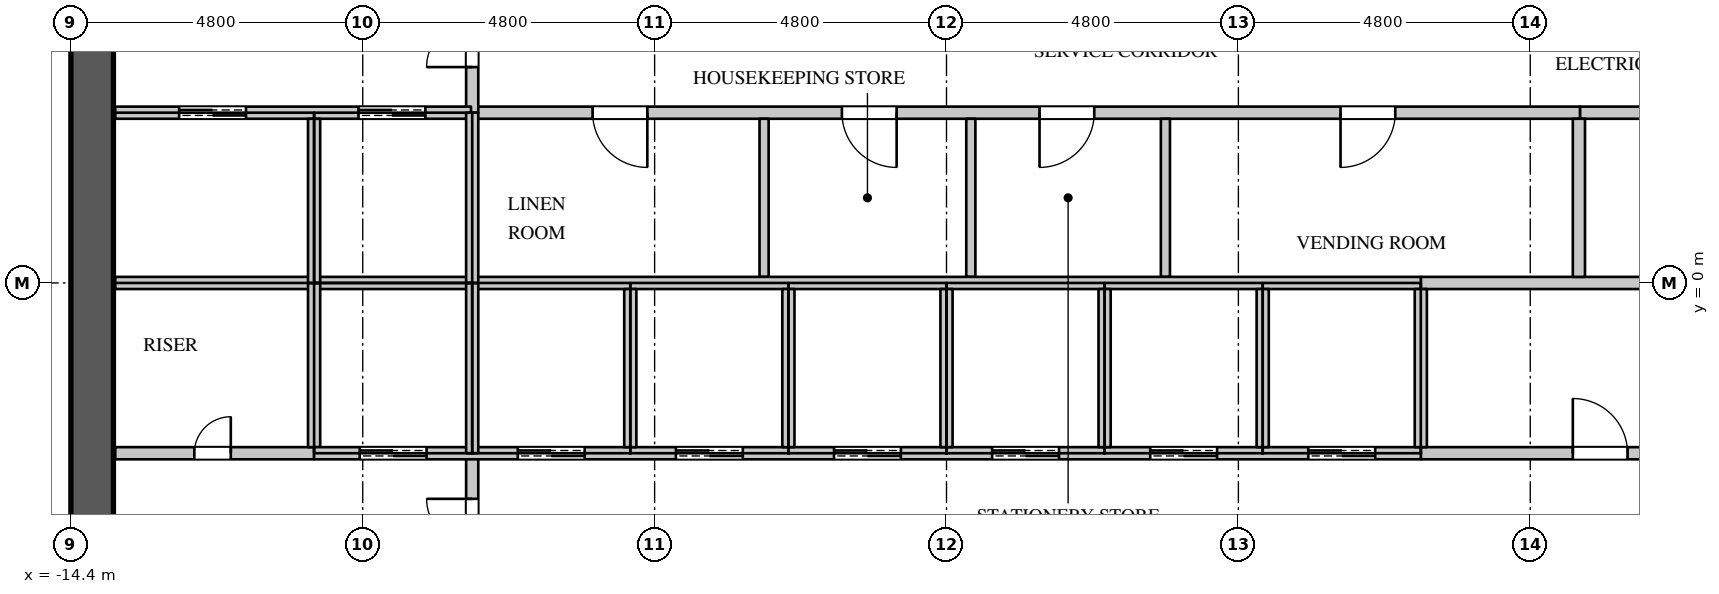
"""IFC4 building model, lengths in metres.
Left out: names, types, materials, properties, quantities, classifications, styles, units other than length and angle.
Written with IfcOpenShell. Run it as: python <this file> out.ifc"""

import sys

from ifc_helpers import new_model, si_unit, direction, frame, frame_2d, origin, place, context, subcontext, project, spatial, rectangle, extrude, element, fill, save


model = new_model("IFC4")
c1 = context("Model", 3, precision=1e-05, world=origin(), true_north=direction((0.0, 1.0)))
c2 = subcontext(c1, "Body", "Model", "MODEL_VIEW")
j1 = project(units=[si_unit("LENGTHUNIT", "METRE"), si_unit("PLANEANGLEUNIT", "RADIAN")], contexts=[c1])
p1 = place(None, origin())
s1 = spatial("IfcSite", under=j1, at=p1, CompositionType="ELEMENT")
p2 = place(p1, origin())
s2 = spatial("IfcBuilding", under=s1, at=p2, CompositionType="ELEMENT")
p3 = place(p2, frame((0.0, 0.0, 174.9)))
s3 = spatial("IfcBuildingStorey", under=s2, at=p3, CompositionType="ELEMENT", Elevation=174.9)
p4 = place(p3, frame((-14.05, -11.3, 0.0), z_axis=(0.0, 0.0, 1.0), x_axis=(0.0, 1.0, 0.0)))
e1 = element("IfcWall", 1, at=p4, inside=s3, PredefinedType="SHEAR", context=c2, shape_type="SweptSolid", body=[
    extrude(rectangle(XDim=22.6, YDim=0.7, at=frame_2d((11.3, 0.0))), origin(), (0.0, 0.0, 1.0), 4.2),
])
p5 = place(p4, frame((20.35, 0.0, 0.0)))
e2 = element("IfcOpeningElement", 2, at=p5, cuts=e1, PredefinedType="OPENING", context=c2, shape_type="SweptSolid", body=[
    extrude(rectangle(XDim=1.1, YDim=2.2, at=frame_2d((0.55, 1.1))), frame((0.0, 0.36, 0.0), z_axis=(0.0, -1.0, 0.0), x_axis=(1.0, 0.0, 0.0)), (0.0, 0.0, 1.0), 0.72),
])
p6 = place(p4, frame((1.15, 0.0, 0.0)))
e3 = element("IfcOpeningElement", 3, at=p6, cuts=e1, PredefinedType="OPENING", context=c2, shape_type="SweptSolid", body=[
    extrude(rectangle(XDim=1.1, YDim=2.2, at=frame_2d((0.55, 1.1))), frame((0.0, 0.36, 0.0), z_axis=(0.0, -1.0, 0.0), x_axis=(1.0, 0.0, 0.0)), (0.0, 0.0, 1.0), 0.72),
])
p7 = place(p4, frame((16.05, 0.0, 0.0)))
e4 = element("IfcOpeningElement", 4, at=p7, cuts=e1, PredefinedType="OPENING", context=c2, shape_type="SweptSolid", body=[
    extrude(rectangle(XDim=1.5, YDim=2.4, at=frame_2d((0.75, 1.2))), frame((0.0, 0.36, 0.0), z_axis=(0.0, -1.0, 0.0), x_axis=(1.0, 0.0, 0.0)), (0.0, 0.0, 1.0), 0.72),
])
p8 = place(p4, frame((5.05, 0.0, 0.0)))
e5 = element("IfcOpeningElement", 5, at=p8, cuts=e1, PredefinedType="OPENING", context=c2, shape_type="SweptSolid", body=[
    extrude(rectangle(XDim=1.5, YDim=2.4, at=frame_2d((0.75, 1.2))), frame((0.0, 0.36, 0.0), z_axis=(0.0, -1.0, 0.0), x_axis=(1.0, 0.0, 0.0)), (0.0, 0.0, 1.0), 0.72),
])
p9 = place(p3, frame((-7.82, 2.8, 0.0), z_axis=(0.0, 0.0, 1.0), x_axis=(1.0, 0.0, 0.0)))
e6 = element("IfcWall", 6, at=p9, inside=s3, PredefinedType="PARTITIONING", context=c2, shape_type="SweptSolid", body=[
    extrude(rectangle(XDim=18.24, YDim=0.2, at=frame_2d((9.12, 0.0))), origin(), (0.0, 0.0, 1.0), 3.95),
])
p10 = place(p9, frame((2.0, 0.0, 0.0)))
e7 = element("IfcOpeningElement", 7, at=p10, cuts=e6, PredefinedType="OPENING", context=c2, shape_type="SweptSolid", body=[
    extrude(rectangle(XDim=0.9, YDim=2.2, at=frame_2d((0.45, 1.1))), frame((0.0, 0.11, 0.0), z_axis=(0.0, -1.0, 0.0), x_axis=(1.0, 0.0, 0.0)), (0.0, 0.0, 1.0), 0.22),
])
p11 = place(p9, frame((6.1, 0.0, 0.0)))
e8 = element("IfcOpeningElement", 8, at=p11, cuts=e6, PredefinedType="OPENING", context=c2, shape_type="SweptSolid", body=[
    extrude(rectangle(XDim=0.9, YDim=2.2, at=frame_2d((0.45, 1.1))), frame((0.0, 0.11, 0.0), z_axis=(0.0, -1.0, 0.0), x_axis=(1.0, 0.0, 0.0)), (0.0, 0.0, 1.0), 0.22),
])
p12 = place(p9, frame((9.35, 0.0, 0.0)))
e9 = element("IfcOpeningElement", 9, at=p12, cuts=e6, PredefinedType="OPENING", context=c2, shape_type="SweptSolid", body=[
    extrude(rectangle(XDim=0.9, YDim=2.2, at=frame_2d((0.45, 1.1))), frame((0.0, 0.11, 0.0), z_axis=(0.0, -1.0, 0.0), x_axis=(1.0, 0.0, 0.0)), (0.0, 0.0, 1.0), 0.22),
])
p13 = place(p9, frame((14.3, 0.0, 0.0)))
e10 = element("IfcOpeningElement", 10, at=p13, cuts=e6, PredefinedType="OPENING", context=c2, shape_type="SweptSolid", body=[
    extrude(rectangle(XDim=0.9, YDim=2.2, at=frame_2d((0.45, 1.1))), frame((0.0, 0.11, 0.0), z_axis=(0.0, -1.0, 0.0), x_axis=(1.0, 0.0, 0.0)), (0.0, 0.0, 1.0), 0.22),
])
p14 = place(p3, frame((-7.8, -5.8, 0.0), z_axis=(0.0, 0.0, 1.0), x_axis=(0.0, 1.0, 0.0)))
e11 = element("IfcWall", 11, at=p14, inside=s3, PredefinedType="PARTITIONING", context=c2, shape_type="SweptSolid", body=[
    extrude(rectangle(XDim=3.0, YDim=0.2, at=frame_2d((1.5, 0.0))), origin(), (0.0, 0.0, 1.0), 3.95),
])
p15 = place(p14, frame((0.75, 0.0, 0.0)))
e12 = element("IfcOpeningElement", 12, at=p15, cuts=e11, PredefinedType="OPENING", context=c2, shape_type="SweptSolid", body=[
    extrude(rectangle(XDim=1.5, YDim=2.4, at=frame_2d((0.75, 1.2))), frame((0.0, 0.11, 0.0), z_axis=(0.0, -1.0, 0.0), x_axis=(1.0, 0.0, 0.0)), (0.0, 0.0, 1.0), 0.22),
])
p16 = place(p3, frame((-7.8, 2.8, 0.0), z_axis=(0.0, 0.0, 1.0), x_axis=(0.0, 1.0, 0.0)))
e13 = element("IfcWall", 13, at=p16, inside=s3, PredefinedType="PARTITIONING", context=c2, shape_type="SweptSolid", body=[
    extrude(rectangle(XDim=5.275, YDim=0.2, at=frame_2d((2.637, 0.0))), origin(), (0.0, 0.0, 1.0), 3.95),
])
p17 = place(p16, frame((0.75, 0.0, 0.0)))
e14 = element("IfcOpeningElement", 14, at=p17, cuts=e13, PredefinedType="OPENING", context=c2, shape_type="SweptSolid", body=[
    extrude(rectangle(XDim=1.5, YDim=2.4, at=frame_2d((0.75, 1.2))), frame((0.0, 0.11, 0.0), z_axis=(0.0, -1.0, 0.0), x_axis=(1.0, 0.0, 0.0)), (0.0, 0.0, 1.0), 0.22),
])
for number, where, z_axis, x_axis in (
    (15, (-3.0, 0.1, 0.0), (0.0, 0.0, 1.0), (0.0, 1.0, 0.0)),
    (16, (0.4, 0.1, 0.0), (0.0, 0.0, 1.0), (0.0, 1.0, 0.0)),
    (17, (3.6, 0.1, 0.0), (0.0, 0.0, 1.0), (0.0, 1.0, 0.0)),
):
    element("IfcWall", number, at=place(p3, frame(where, z_axis=z_axis, x_axis=x_axis)), inside=s3, PredefinedType="PARTITIONING", context=c2, shape_type="SweptSolid", body=[
        extrude(rectangle(XDim=2.6, YDim=0.15, at=frame_2d((1.3, 0.0))), origin(), (0.0, 0.0, 1.0), 3.95),
    ])
p18 = place(p3, frame((-13.67, -2.8, 0.0), z_axis=(0.0, 0.0, 1.0), x_axis=(1.0, 0.0, 0.0)))
e18 = element("IfcWall", 18, at=p18, inside=s3, PredefinedType="PARTITIONING", context=c2, shape_type="SweptSolid", body=[
    extrude(rectangle(XDim=3.27, YDim=0.2, at=frame_2d((1.635, 0.0))), origin(), (0.0, 0.0, 1.0), 3.95),
])
p19 = place(p18, frame((1.3, 0.0, 0.0)))
e19 = element("IfcOpeningElement", 19, at=p19, cuts=e18, PredefinedType="OPENING", context=c2, shape_type="SweptSolid", body=[
    extrude(rectangle(XDim=0.6, YDim=2.0, at=frame_2d((0.3, 1.0))), frame((0.0, 0.11, 0.0), z_axis=(0.0, -1.0, 0.0), x_axis=(1.0, 0.0, 0.0)), (0.0, 0.0, 1.0), 0.22),
])
p20 = place(p3, frame((7.8, -2.8, 0.0), z_axis=(0.0, 0.0, 1.0), x_axis=(1.0, 0.0, 0.0)))
e20 = element("IfcWall", 20, at=p20, inside=s3, PredefinedType="PARTITIONING", context=c2, shape_type="SweptSolid", body=[
    extrude(rectangle(XDim=5.87, YDim=0.2, at=frame_2d((2.935, 0.0))), origin(), (0.0, 0.0, 1.0), 3.95),
])
p21 = place(p20, frame((2.5, 0.0, 0.0)))
e21 = element("IfcOpeningElement", 21, at=p21, cuts=e20, PredefinedType="OPENING", context=c2, shape_type="SweptSolid", body=[
    extrude(rectangle(XDim=0.9, YDim=2.2, at=frame_2d((0.45, 1.1))), frame((0.0, 0.11, 0.0), z_axis=(0.0, -1.0, 0.0), x_axis=(1.0, 0.0, 0.0)), (0.0, 0.0, 1.0), 0.22),
])
p22 = place(p3, frame((7.8, 0.0, 0.0), z_axis=(0.0, 0.0, 1.0), x_axis=(1.0, 0.0, 0.0)))
e22 = element("IfcWall", 22, at=p22, inside=s3, PredefinedType="PARTITIONING", context=c2, shape_type="SweptSolid", body=[
    extrude(rectangle(XDim=5.87, YDim=0.2, at=frame_2d((2.935, 0.0))), origin(), (0.0, 0.0, 1.0), 3.95),
])
p23 = place(p3, frame((10.42, 2.8, 0.0), z_axis=(0.0, 0.0, 1.0), x_axis=(1.0, 0.0, 0.0)))
e23 = element("IfcWall", 23, at=p23, inside=s3, PredefinedType="PARTITIONING", context=c2, shape_type="SweptSolid", body=[
    extrude(rectangle(XDim=3.25, YDim=0.2, at=frame_2d((1.625, 0.0))), origin(), (0.0, 0.0, 1.0), 3.95),
])
p24 = place(p23, frame((1.3, 0.0, 0.0)))
e24 = element("IfcOpeningElement", 24, at=p24, cuts=e23, PredefinedType="OPENING", context=c2, shape_type="SweptSolid", body=[
    extrude(rectangle(XDim=0.6, YDim=2.0, at=frame_2d((0.3, 1.0))), frame((0.0, 0.11, 0.0), z_axis=(0.0, -1.0, 0.0), x_axis=(1.0, 0.0, 0.0)), (0.0, 0.0, 1.0), 0.22),
])
p25 = place(p3, frame((10.4, 0.1, 0.0), z_axis=(0.0, 0.0, 1.0), x_axis=(0.0, 1.0, 0.0)))
e25 = element("IfcWall", 25, at=p25, inside=s3, PredefinedType="PARTITIONING", context=c2, shape_type="SweptSolid", body=[
    extrude(rectangle(XDim=2.6, YDim=0.2, at=frame_2d((1.3, 0.0))), origin(), (0.0, 0.0, 1.0), 3.95),
])
p26 = place(p3, frame((-13.67, 0.0, 0.0), z_axis=(0.0, 0.0, 1.0), x_axis=(1.0, 0.0, 0.0)))
e26 = element("IfcWall", 26, at=p26, inside=s3, PredefinedType="PARTITIONING", context=c2, shape_type="SweptSolid", body=[
    extrude(rectangle(XDim=21.47, YDim=0.2, at=frame_2d((10.735, 0.0))), origin(), (0.0, 0.0, 1.0), 3.95),
])
p27 = place(p3, frame((-13.67, 2.8, 0.0), z_axis=(0.0, 0.0, 1.0), x_axis=(1.0, 0.0, 0.0)))
e27 = element("IfcWall", 27, at=p27, inside=s3, PredefinedType="PARTITIONING", context=c2, shape_type="SweptSolid", body=[
    extrude(rectangle(XDim=5.85, YDim=0.2, at=frame_2d((2.925, 0.0))), origin(), (0.0, 0.0, 1.0), 3.95),
])
p28 = place(p27, frame((1.05, 0.0, 0.0)))
e28 = element("IfcOpeningElement", 28, at=p28, cuts=e27, PredefinedType="OPENING", context=c2, shape_type="SweptSolid", body=[
    extrude(rectangle(XDim=1.1, YDim=2.2, at=frame_2d((0.55, 1.1))), frame((0.0, 0.11, 0.0), z_axis=(0.0, -1.0, 0.0), x_axis=(1.0, 0.0, 0.0)), (0.0, 0.0, 1.0), 0.22),
])
p29 = place(p27, frame((4.0, 0.0, 0.0)))
e29 = element("IfcOpeningElement", 29, at=p29, cuts=e27, PredefinedType="OPENING", context=c2, shape_type="SweptSolid", body=[
    extrude(rectangle(XDim=1.1, YDim=2.2, at=frame_2d((0.55, 1.1))), frame((0.0, 0.11, 0.0), z_axis=(0.0, -1.0, 0.0), x_axis=(1.0, 0.0, 0.0)), (0.0, 0.0, 1.0), 0.22),
])
p30 = place(p3, frame((-10.4, -2.7, 0.0), z_axis=(0.0, 0.0, 1.0), x_axis=(0.0, 1.0, 0.0)))
e30 = element("IfcWall", 30, at=p30, inside=s3, PredefinedType="PARTITIONING", context=c2, shape_type="SweptSolid", body=[
    extrude(rectangle(XDim=2.7, YDim=0.2, at=frame_2d((1.35, 0.0))), origin(), (0.0, 0.0, 1.0), 3.95),
])
p31 = place(p3, frame((-10.4, -2.8, 0.0), z_axis=(0.0, 0.0, 1.0), x_axis=(1.0, 0.0, 0.0)))
e31 = element("IfcWall", 31, at=p31, inside=s3, PredefinedType="PARTITIONING", context=c2, shape_type="SweptSolid", body=[
    extrude(rectangle(XDim=18.2, YDim=0.2, at=frame_2d((9.1, 0.0))), origin(), (0.0, 0.0, 1.0), 3.95),
])
p32 = place(p31, frame((0.75, 0.0, 0.0)))
e32 = element("IfcOpeningElement", 32, at=p32, cuts=e31, PredefinedType="OPENING", context=c2, shape_type="SweptSolid", body=[
    extrude(rectangle(XDim=1.1, YDim=2.2, at=frame_2d((0.55, 1.1))), frame((0.0, 0.11, 0.0), z_axis=(0.0, -1.0, 0.0), x_axis=(1.0, 0.0, 0.0)), (0.0, 0.0, 1.0), 0.22),
])
p33 = place(p31, frame((3.35, 0.0, 0.0)))
e33 = element("IfcOpeningElement", 33, at=p33, cuts=e31, PredefinedType="OPENING", context=c2, shape_type="SweptSolid", body=[
    extrude(rectangle(XDim=1.1, YDim=2.2, at=frame_2d((0.55, 1.1))), frame((0.0, 0.11, 0.0), z_axis=(0.0, -1.0, 0.0), x_axis=(1.0, 0.0, 0.0)), (0.0, 0.0, 1.0), 0.22),
])
p34 = place(p31, frame((5.95, 0.0, 0.0)))
e34 = element("IfcOpeningElement", 34, at=p34, cuts=e31, PredefinedType="OPENING", context=c2, shape_type="SweptSolid", body=[
    extrude(rectangle(XDim=1.1, YDim=2.2, at=frame_2d((0.55, 1.1))), frame((0.0, 0.11, 0.0), z_axis=(0.0, -1.0, 0.0), x_axis=(1.0, 0.0, 0.0)), (0.0, 0.0, 1.0), 0.22),
])
p35 = place(p31, frame((8.55, 0.0, 0.0)))
e35 = element("IfcOpeningElement", 35, at=p35, cuts=e31, PredefinedType="OPENING", context=c2, shape_type="SweptSolid", body=[
    extrude(rectangle(XDim=1.1, YDim=2.2, at=frame_2d((0.55, 1.1))), frame((0.0, 0.11, 0.0), z_axis=(0.0, -1.0, 0.0), x_axis=(1.0, 0.0, 0.0)), (0.0, 0.0, 1.0), 0.22),
])
p36 = place(p31, frame((11.15, 0.0, 0.0)))
e36 = element("IfcOpeningElement", 36, at=p36, cuts=e31, PredefinedType="OPENING", context=c2, shape_type="SweptSolid", body=[
    extrude(rectangle(XDim=1.1, YDim=2.2, at=frame_2d((0.55, 1.1))), frame((0.0, 0.11, 0.0), z_axis=(0.0, -1.0, 0.0), x_axis=(1.0, 0.0, 0.0)), (0.0, 0.0, 1.0), 0.22),
])
p37 = place(p31, frame((13.75, 0.0, 0.0)))
e37 = element("IfcOpeningElement", 37, at=p37, cuts=e31, PredefinedType="OPENING", context=c2, shape_type="SweptSolid", body=[
    extrude(rectangle(XDim=1.1, YDim=2.2, at=frame_2d((0.55, 1.1))), frame((0.0, 0.11, 0.0), z_axis=(0.0, -1.0, 0.0), x_axis=(1.0, 0.0, 0.0)), (0.0, 0.0, 1.0), 0.22),
])
p38 = place(p31, frame((16.35, 0.0, 0.0)))
e38 = element("IfcOpeningElement", 38, at=p38, cuts=e31, PredefinedType="OPENING", context=c2, shape_type="SweptSolid", body=[
    extrude(rectangle(XDim=1.1, YDim=2.2, at=frame_2d((0.55, 1.1))), frame((0.0, 0.11, 0.0), z_axis=(0.0, -1.0, 0.0), x_axis=(1.0, 0.0, 0.0)), (0.0, 0.0, 1.0), 0.22),
])
p39 = place(p3, frame((-10.4, 0.0, 0.0), z_axis=(0.0, 0.0, 1.0), x_axis=(0.0, 1.0, 0.0)))
e39 = element("IfcWall", 39, at=p39, inside=s3, PredefinedType="PARTITIONING", context=c2, shape_type="SweptSolid", body=[
    extrude(rectangle(XDim=2.7, YDim=0.2, at=frame_2d((1.35, 0.0))), origin(), (0.0, 0.0, 1.0), 3.95),
])
for number, where, z_axis, x_axis in (
    (40, (-7.8, -2.8, 0.0), (0.0, 0.0, 1.0), (0.0, 1.0, 0.0)),
    (41, (-7.8, 0.0, 0.0), (0.0, 0.0, 1.0), (0.0, 1.0, 0.0)),
):
    element("IfcWall", number, at=place(p3, frame(where, z_axis=z_axis, x_axis=x_axis)), inside=s3, PredefinedType="PARTITIONING", context=c2, shape_type="SweptSolid", body=[
        extrude(rectangle(XDim=2.8, YDim=0.2, at=frame_2d((1.4, 0.0))), origin(), (0.0, 0.0, 1.0), 3.95),
    ])
for number, where, z_axis, x_axis in (
    (42, (-5.2, -2.7, 0.0), (0.0, 0.0, 1.0), (0.0, 1.0, 0.0)),
    (43, (-2.6, -2.7, 0.0), (0.0, 0.0, 1.0), (0.0, 1.0, 0.0)),
    (44, (0.0, -2.7, 0.0), (0.0, 0.0, 1.0), (0.0, 1.0, 0.0)),
    (45, (2.6, -2.7, 0.0), (0.0, 0.0, 1.0), (0.0, 1.0, 0.0)),
    (46, (5.2, -2.7, 0.0), (0.0, 0.0, 1.0), (0.0, 1.0, 0.0)),
    (47, (7.8, -2.7, 0.0), (0.0, 0.0, 1.0), (0.0, 1.0, 0.0)),
):
    element("IfcWall", number, at=place(p3, frame(where, z_axis=z_axis, x_axis=x_axis)), inside=s3, PredefinedType="PARTITIONING", context=c2, shape_type="SweptSolid", body=[
        extrude(rectangle(XDim=2.6, YDim=0.2, at=frame_2d((1.3, 0.0))), origin(), (0.0, 0.0, 1.0), 3.95),
    ])
p40 = place(p19, origin())
e48 = element("IfcDoor", 48, at=p40, inside=s3, OperationType="SINGLE_SWING_RIGHT", PredefinedType="DOOR", context=c2, shape_type="SweptSolid", body=[
    extrude(rectangle(XDim=0.6, YDim=2.0, at=frame_2d((0.3, 1.0))), frame((0.0, 0.025, 0.0), z_axis=(0.0, -1.0, 0.0), x_axis=(1.0, 0.0, 0.0)), (0.0, 0.0, 1.0), 0.05),
])
fill(e19, e48)
p41 = place(p21, origin())
e49 = element("IfcDoor", 49, at=p41, inside=s3, OperationType="SINGLE_SWING_LEFT", PredefinedType="DOOR", context=c2, shape_type="SweptSolid", body=[
    extrude(rectangle(XDim=0.9, YDim=2.2, at=frame_2d((0.45, 1.1))), frame((0.0, 0.025, 0.0), z_axis=(0.0, -1.0, 0.0), x_axis=(1.0, 0.0, 0.0)), (0.0, 0.0, 1.0), 0.05),
])
fill(e21, e49)
p42 = place(p10, origin())
e50 = element("IfcDoor", 50, at=p42, inside=s3, OperationType="SINGLE_SWING_LEFT", PredefinedType="DOOR", context=c2, shape_type="SweptSolid", body=[
    extrude(rectangle(XDim=0.9, YDim=2.2, at=frame_2d((0.45, 1.1))), frame((0.0, 0.025, 0.0), z_axis=(0.0, -1.0, 0.0), x_axis=(1.0, 0.0, 0.0)), (0.0, 0.0, 1.0), 0.05),
])
fill(e7, e50)
p43 = place(p11, origin())
e51 = element("IfcDoor", 51, at=p43, inside=s3, OperationType="SINGLE_SWING_LEFT", PredefinedType="DOOR", context=c2, shape_type="SweptSolid", body=[
    extrude(rectangle(XDim=0.9, YDim=2.2, at=frame_2d((0.45, 1.1))), frame((0.0, 0.025, 0.0), z_axis=(0.0, -1.0, 0.0), x_axis=(1.0, 0.0, 0.0)), (0.0, 0.0, 1.0), 0.05),
])
fill(e8, e51)
p44 = place(p12, origin())
e52 = element("IfcDoor", 52, at=p44, inside=s3, OperationType="SINGLE_SWING_RIGHT", PredefinedType="DOOR", context=c2, shape_type="SweptSolid", body=[
    extrude(rectangle(XDim=0.9, YDim=2.2, at=frame_2d((0.45, 1.1))), frame((0.0, 0.025, 0.0), z_axis=(0.0, -1.0, 0.0), x_axis=(1.0, 0.0, 0.0)), (0.0, 0.0, 1.0), 0.05),
])
fill(e9, e52)
p45 = place(p13, origin())
e53 = element("IfcDoor", 53, at=p45, inside=s3, OperationType="SINGLE_SWING_RIGHT", PredefinedType="DOOR", context=c2, shape_type="SweptSolid", body=[
    extrude(rectangle(XDim=0.9, YDim=2.2, at=frame_2d((0.45, 1.1))), frame((0.0, 0.025, 0.0), z_axis=(0.0, -1.0, 0.0), x_axis=(1.0, 0.0, 0.0)), (0.0, 0.0, 1.0), 0.05),
])
fill(e10, e53)
p46 = place(p28, origin())
e54 = element("IfcDoor", 54, at=p46, inside=s3, OperationType="DOUBLE_DOOR_SLIDING", PredefinedType="DOOR", context=c2, shape_type="SweptSolid", body=[
    extrude(rectangle(XDim=1.1, YDim=2.2, at=frame_2d((0.55, 1.1))), frame((0.0, 0.025, 0.0), z_axis=(0.0, -1.0, 0.0), x_axis=(1.0, 0.0, 0.0)), (0.0, 0.0, 1.0), 0.05),
])
fill(e28, e54)
p47 = place(p29, origin())
e55 = element("IfcDoor", 55, at=p47, inside=s3, OperationType="DOUBLE_DOOR_SLIDING", PredefinedType="DOOR", context=c2, shape_type="SweptSolid", body=[
    extrude(rectangle(XDim=1.1, YDim=2.2, at=frame_2d((0.55, 1.1))), frame((0.0, 0.025, 0.0), z_axis=(0.0, -1.0, 0.0), x_axis=(1.0, 0.0, 0.0)), (0.0, 0.0, 1.0), 0.05),
])
fill(e29, e55)
p48 = place(p32, origin())
e56 = element("IfcDoor", 56, at=p48, inside=s3, OperationType="DOUBLE_DOOR_SLIDING", PredefinedType="DOOR", context=c2, shape_type="SweptSolid", body=[
    extrude(rectangle(XDim=1.1, YDim=2.2, at=frame_2d((0.55, 1.1))), frame((0.0, 0.025, 0.0), z_axis=(0.0, -1.0, 0.0), x_axis=(1.0, 0.0, 0.0)), (0.0, 0.0, 1.0), 0.05),
])
fill(e32, e56)
p49 = place(p33, origin())
e57 = element("IfcDoor", 57, at=p49, inside=s3, OperationType="DOUBLE_DOOR_SLIDING", PredefinedType="DOOR", context=c2, shape_type="SweptSolid", body=[
    extrude(rectangle(XDim=1.1, YDim=2.2, at=frame_2d((0.55, 1.1))), frame((0.0, 0.025, 0.0), z_axis=(0.0, -1.0, 0.0), x_axis=(1.0, 0.0, 0.0)), (0.0, 0.0, 1.0), 0.05),
])
fill(e33, e57)
p50 = place(p34, origin())
e58 = element("IfcDoor", 58, at=p50, inside=s3, OperationType="DOUBLE_DOOR_SLIDING", PredefinedType="DOOR", context=c2, shape_type="SweptSolid", body=[
    extrude(rectangle(XDim=1.1, YDim=2.2, at=frame_2d((0.55, 1.1))), frame((0.0, 0.025, 0.0), z_axis=(0.0, -1.0, 0.0), x_axis=(1.0, 0.0, 0.0)), (0.0, 0.0, 1.0), 0.05),
])
fill(e34, e58)
p51 = place(p35, origin())
e59 = element("IfcDoor", 59, at=p51, inside=s3, OperationType="DOUBLE_DOOR_SLIDING", PredefinedType="DOOR", context=c2, shape_type="SweptSolid", body=[
    extrude(rectangle(XDim=1.1, YDim=2.2, at=frame_2d((0.55, 1.1))), frame((0.0, 0.025, 0.0), z_axis=(0.0, -1.0, 0.0), x_axis=(1.0, 0.0, 0.0)), (0.0, 0.0, 1.0), 0.05),
])
fill(e35, e59)
p52 = place(p36, origin())
e60 = element("IfcDoor", 60, at=p52, inside=s3, OperationType="DOUBLE_DOOR_SLIDING", PredefinedType="DOOR", context=c2, shape_type="SweptSolid", body=[
    extrude(rectangle(XDim=1.1, YDim=2.2, at=frame_2d((0.55, 1.1))), frame((0.0, 0.025, 0.0), z_axis=(0.0, -1.0, 0.0), x_axis=(1.0, 0.0, 0.0)), (0.0, 0.0, 1.0), 0.05),
])
fill(e36, e60)
p53 = place(p37, origin())
e61 = element("IfcDoor", 61, at=p53, inside=s3, OperationType="DOUBLE_DOOR_SLIDING", PredefinedType="DOOR", context=c2, shape_type="SweptSolid", body=[
    extrude(rectangle(XDim=1.1, YDim=2.2, at=frame_2d((0.55, 1.1))), frame((0.0, 0.025, 0.0), z_axis=(0.0, -1.0, 0.0), x_axis=(1.0, 0.0, 0.0)), (0.0, 0.0, 1.0), 0.05),
])
fill(e37, e61)
p54 = place(p38, origin())
e62 = element("IfcDoor", 62, at=p54, inside=s3, OperationType="DOUBLE_DOOR_SLIDING", PredefinedType="DOOR", context=c2, shape_type="SweptSolid", body=[
    extrude(rectangle(XDim=1.1, YDim=2.2, at=frame_2d((0.55, 1.1))), frame((0.0, 0.025, 0.0), z_axis=(0.0, -1.0, 0.0), x_axis=(1.0, 0.0, 0.0)), (0.0, 0.0, 1.0), 0.05),
])
fill(e38, e62)
p55 = place(p17, origin())
e63 = element("IfcDoor", 63, at=p55, inside=s3, OperationType="DOUBLE_DOOR_SINGLE_SWING", PredefinedType="DOOR", context=c2, shape_type="SweptSolid", body=[
    extrude(rectangle(XDim=1.5, YDim=2.4, at=frame_2d((0.75, 1.2))), frame((0.0, 0.025, 0.0), z_axis=(0.0, -1.0, 0.0), x_axis=(1.0, 0.0, 0.0)), (0.0, 0.0, 1.0), 0.05),
])
fill(e14, e63)
p56 = place(p15, origin())
e64 = element("IfcDoor", 64, at=p56, inside=s3, OperationType="DOUBLE_DOOR_SINGLE_SWING", PredefinedType="DOOR", context=c2, shape_type="SweptSolid", body=[
    extrude(rectangle(XDim=1.5, YDim=2.4, at=frame_2d((0.75, 1.2))), frame((0.0, 0.025, 0.0), z_axis=(0.0, -1.0, 0.0), x_axis=(1.0, 0.0, 0.0)), (0.0, 0.0, 1.0), 0.05),
])
fill(e12, e64)
save(model, sys.argv[1])
